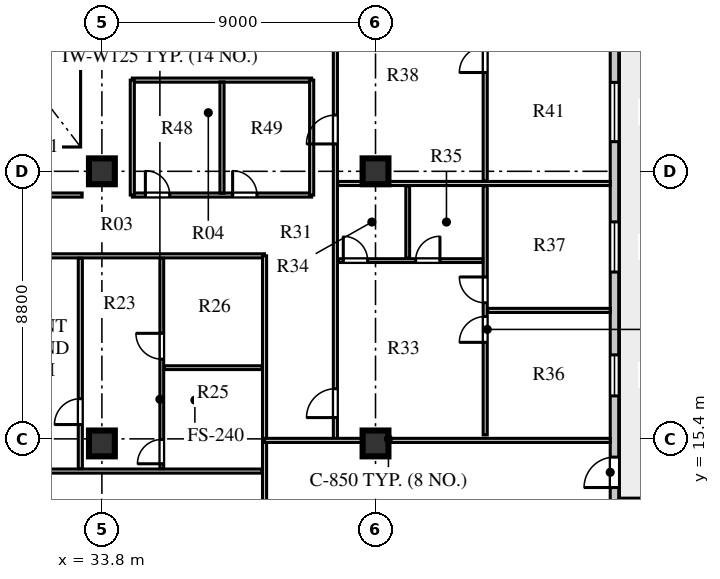
"""IFC4 building model, lengths in metres.
Left out: names, types, materials, properties, quantities, classifications, styles, units other than length and angle.
Written with IfcOpenShell. Run it as: python <this file> out.ifc"""

import sys

from ifc_helpers import new_model, si_unit, direction, frame, frame_2d, origin, origin_2d, place, context, subcontext, project, spatial, rectangle, extrude, element, fill, save


model = new_model("IFC4")
c1 = context("Model", 3, precision=1e-05, world=origin(), true_north=direction((0.0, 1.0)))
c2 = subcontext(c1, "Body", "Model", "MODEL_VIEW")
j1 = project(units=[si_unit("LENGTHUNIT", "METRE"), si_unit("PLANEANGLEUNIT", "RADIAN")], contexts=[c1])
p1 = place(None, origin())
s1 = spatial("IfcSite", under=j1, at=p1, CompositionType="ELEMENT")
p2 = place(p1, origin())
s2 = spatial("IfcBuilding", under=s1, at=p2, CompositionType="ELEMENT")
p3 = place(p2, frame((0.0, 0.0, 229.7)))
s3 = spatial("IfcBuildingStorey", under=s2, at=p3, CompositionType="ELEMENT", Elevation=229.7)
for number, where, z_axis, x_axis in (
    (1, (33.8, 15.25, 0.0), (0.0, 0.0, 1.0), (1.0, 0.0, 0.0)),
    (2, (33.8, 24.2, 0.0), (0.0, 0.0, 1.0), (1.0, 0.0, 0.0)),
    (3, (42.8, 15.25, 0.0), (0.0, 0.0, 1.0), (1.0, 0.0, 0.0)),
    (4, (42.8, 24.2, 0.0), (0.0, 0.0, 1.0), (1.0, 0.0, 0.0)),
):
    element("IfcColumn", number, at=place(p3, frame(where, z_axis=z_axis, x_axis=x_axis)), inside=s3, PredefinedType="COLUMN", context=c2, shape_type="SweptSolid", body=[
        extrude(rectangle(XDim=0.85, YDim=0.85, at=origin_2d()), origin(), (0.0, 0.0, 1.0), 3.66),
    ])
p4 = place(p3, frame((50.66, 13.13, 0.0), z_axis=(0.0, 0.0, 1.0), x_axis=(0.0, 1.0, 0.0)))
e5 = element("IfcWall", 5, at=p4, inside=s3, PredefinedType="STANDARD", context=c2, shape_type="SweptSolid", body=[
    extrude(rectangle(XDim=30.94, YDim=0.28, at=frame_2d((15.47, 0.0))), origin(), (0.0, 0.0, 1.0), 3.66),
])
p5 = place(p4, frame((0.67, 0.0, 0.0)))
e6 = element("IfcOpeningElement", 6, at=p5, cuts=e5, PredefinedType="OPENING", context=c2, shape_type="SweptSolid", body=[
    extrude(rectangle(XDim=1.0, YDim=2.05, at=frame_2d((0.5, 1.025))), frame((0.0, 0.15, 0.0), z_axis=(0.0, -1.0, 0.0), x_axis=(1.0, 0.0, 0.0)), (0.0, 0.0, 1.0), 0.3),
])
p6 = place(p4, frame((3.683, 0.0, 0.8)))
e7 = element("IfcOpeningElement", 7, at=p6, cuts=e5, PredefinedType="OPENING", context=c2, shape_type="SweptSolid", body=[
    extrude(rectangle(XDim=1.35, YDim=1.9, at=frame_2d((0.675, 0.95))), frame((0.0, 0.15, 0.0), z_axis=(0.0, -1.0, 0.0), x_axis=(1.0, 0.0, 0.0)), (0.0, 0.0, 1.0), 0.3),
])
p7 = place(p4, frame((7.757, 0.0, 0.8)))
e8 = element("IfcOpeningElement", 8, at=p7, cuts=e5, PredefinedType="OPENING", context=c2, shape_type="SweptSolid", body=[
    extrude(rectangle(XDim=1.65, YDim=1.95, at=frame_2d((0.825, 0.975))), frame((0.0, 0.15, 0.0), z_axis=(0.0, -1.0, 0.0), x_axis=(1.0, 0.0, 0.0)), (0.0, 0.0, 1.0), 0.3),
])
p8 = place(p4, frame((12.045, 0.0, 0.8)))
e9 = element("IfcOpeningElement", 9, at=p8, cuts=e5, PredefinedType="OPENING", context=c2, shape_type="SweptSolid", body=[
    extrude(rectangle(XDim=1.95, YDim=2.0, at=frame_2d((0.975, 1.0))), frame((0.0, 0.15, 0.0), z_axis=(0.0, -1.0, 0.0), x_axis=(1.0, 0.0, 0.0)), (0.0, 0.0, 1.0), 0.3),
])
p9 = place(p4, frame((16.595, 0.0, 0.8)))
e10 = element("IfcOpeningElement", 10, at=p9, cuts=e5, PredefinedType="OPENING", context=c2, shape_type="SweptSolid", body=[
    extrude(rectangle(XDim=2.25, YDim=2.0, at=frame_2d((1.125, 1.0))), frame((0.0, 0.15, 0.0), z_axis=(0.0, -1.0, 0.0), x_axis=(1.0, 0.0, 0.0)), (0.0, 0.0, 1.0), 0.3),
])
p10 = place(p4, frame((21.307, 0.0, 0.8)))
e11 = element("IfcOpeningElement", 11, at=p10, cuts=e5, PredefinedType="OPENING", context=c2, shape_type="SweptSolid", body=[
    extrude(rectangle(XDim=1.8, YDim=2.0, at=frame_2d((0.9, 1.0))), frame((0.0, 0.15, 0.0), z_axis=(0.0, -1.0, 0.0), x_axis=(1.0, 0.0, 0.0)), (0.0, 0.0, 1.0), 0.3),
])
p11 = place(p4, frame((25.782, 0.0, 0.8)))
e12 = element("IfcOpeningElement", 12, at=p11, cuts=e5, PredefinedType="OPENING", context=c2, shape_type="SweptSolid", body=[
    extrude(rectangle(XDim=1.5, YDim=2.0, at=frame_2d((0.75, 1.0))), frame((0.0, 0.15, 0.0), z_axis=(0.0, -1.0, 0.0), x_axis=(1.0, 0.0, 0.0)), (0.0, 0.0, 1.0), 0.3),
])
p12 = place(p4, frame((29.175, 0.0, 0.8)))
e13 = element("IfcOpeningElement", 13, at=p12, cuts=e5, PredefinedType="OPENING", context=c2, shape_type="SweptSolid", body=[
    extrude(rectangle(XDim=1.2, YDim=1.75, at=frame_2d((0.6, 0.875))), frame((0.0, 0.15, 0.0), z_axis=(0.0, -1.0, 0.0), x_axis=(1.0, 0.0, 0.0)), (0.0, 0.0, 1.0), 0.3),
])
p13 = place(p3, frame((27.08, 21.42, 0.0), z_axis=(0.0, 0.0, 1.0), x_axis=(1.0, 0.0, 0.0)))
e14 = element("IfcWall", 14, at=p13, inside=s3, PredefinedType="PARTITIONING", context=c2, shape_type="SweptSolid", body=[
    extrude(rectangle(XDim=12.07, YDim=0.135, at=frame_2d((6.035, 0.0))), origin(), (0.0, 0.0, 1.0), 3.31),
])
p14 = place(p13, frame((0.63, 0.0, 0.0)))
e15 = element("IfcOpeningElement", 15, at=p14, cuts=e14, PredefinedType="OPENING", context=c2, shape_type="SweptSolid", body=[
    extrude(rectangle(XDim=0.95, YDim=2.1, at=frame_2d((0.475, 1.05))), frame((0.0, 0.078, 0.0), z_axis=(0.0, -1.0, 0.0), x_axis=(1.0, 0.0, 0.0)), (0.0, 0.0, 1.0), 0.155),
])
p15 = place(p3, frame((27.15, 23.42, 0.0), z_axis=(0.0, 0.0, 1.0), x_axis=(1.0, 0.0, 0.0)))
e16 = element("IfcWall", 16, at=p15, inside=s3, PredefinedType="PARTITIONING", context=c2, shape_type="SweptSolid", body=[
    extrude(rectangle(XDim=6.0, YDim=0.135, at=frame_2d((3.0, 0.0))), origin(), (0.0, 0.0, 1.0), 3.66),
])
p16 = place(p3, frame((39.15, 7.88, 0.0), z_axis=(0.0, 0.0, 1.0), x_axis=(0.0, 1.0, 0.0)))
e17 = element("IfcWall", 17, at=p16, inside=s3, PredefinedType="PARTITIONING", context=c2, shape_type="SweptSolid", body=[
    extrude(rectangle(XDim=13.54, YDim=0.135, at=frame_2d((6.77, 0.0))), origin(), (0.0, 0.0, 1.0), 3.66),
])
p17 = place(p3, frame((27.24, 14.341, 0.0), z_axis=(0.0, 0.0, 1.0), x_axis=(1.0, 0.0, 0.0)))
e18 = element("IfcWall", 18, at=p17, inside=s3, PredefinedType="PARTITIONING", context=c2, shape_type="SweptSolid", body=[
    extrude(rectangle(XDim=11.83, YDim=0.135, at=frame_2d((5.915, 0.0))), origin(), (0.0, 0.0, 1.0), 3.66),
])
p18 = place(p17, frame((0.3, 0.0, 0.0)))
e19 = element("IfcOpeningElement", 19, at=p18, cuts=e18, PredefinedType="OPENING", context=c2, shape_type="SweptSolid", body=[
    extrude(rectangle(XDim=0.85, YDim=2.08, at=frame_2d((0.425, 1.04))), frame((0.0, 0.078, 0.0), z_axis=(0.0, -1.0, 0.0), x_axis=(1.0, 0.0, 0.0)), (0.0, 0.0, 1.0), 0.155),
])
p19 = place(p17, frame((3.135, 0.0, 0.0)))
e20 = element("IfcOpeningElement", 20, at=p19, cuts=e18, PredefinedType="OPENING", context=c2, shape_type="SweptSolid", body=[
    extrude(rectangle(XDim=0.85, YDim=2.08, at=frame_2d((0.425, 1.04))), frame((0.0, 0.078, 0.0), z_axis=(0.0, -1.0, 0.0), x_axis=(1.0, 0.0, 0.0)), (0.0, 0.0, 1.0), 0.155),
])
p20 = place(p3, frame((35.77, 14.421, 0.0), z_axis=(0.0, 0.0, 1.0), x_axis=(0.0, 1.0, 0.0)))
e21 = element("IfcWall", 21, at=p20, inside=s3, PredefinedType="PLUMBINGWALL", context=c2, shape_type="SweptSolid", body=[
    extrude(rectangle(XDim=6.919, YDim=0.125, at=frame_2d((3.459, 0.0))), origin(), (0.0, 0.0, 1.0), 3.66),
])
p21 = place(p20, frame((0.16, 0.0, 0.0)))
e22 = element("IfcOpeningElement", 22, at=p21, cuts=e21, PredefinedType="OPENING", context=c2, shape_type="SweptSolid", body=[
    extrude(rectangle(XDim=0.8, YDim=2.05, at=frame_2d((0.4, 1.025))), frame((0.0, 0.073, 0.0), z_axis=(0.0, -1.0, 0.0), x_axis=(1.0, 0.0, 0.0)), (0.0, 0.0, 1.0), 0.145),
])
p22 = place(p20, frame((3.601, 0.0, 0.0)))
e23 = element("IfcOpeningElement", 23, at=p22, cuts=e21, PredefinedType="OPENING", context=c2, shape_type="SweptSolid", body=[
    extrude(rectangle(XDim=0.85, YDim=2.08, at=frame_2d((0.425, 1.04))), frame((0.0, 0.073, 0.0), z_axis=(0.0, -1.0, 0.0), x_axis=(1.0, 0.0, 0.0)), (0.0, 0.0, 1.0), 0.145),
])
p23 = place(p3, frame((35.85, 17.742, 0.0), z_axis=(0.0, 0.0, 1.0), x_axis=(1.0, 0.0, 0.0)))
e24 = element("IfcWall", 24, at=p23, inside=s3, PredefinedType="PLUMBINGWALL", context=c2, shape_type="SweptSolid", body=[
    extrude(rectangle(XDim=3.22, YDim=0.125, at=frame_2d((1.61, 0.0))), origin(), (0.0, 0.0, 1.0), 3.66),
])
p24 = place(p3, frame((33.09, 14.421, 0.0), z_axis=(0.0, 0.0, 1.0), x_axis=(0.0, 1.0, 0.0)))
e25 = element("IfcWall", 25, at=p24, inside=s3, PredefinedType="PARTITIONING", context=c2, shape_type="SweptSolid", body=[
    extrude(rectangle(XDim=6.919, YDim=0.135, at=frame_2d((3.459, 0.0))), origin(), (0.0, 0.0, 1.0), 3.66),
])
p25 = place(p24, frame((1.45, 0.0, 0.0)))
e26 = element("IfcOpeningElement", 26, at=p25, cuts=e25, PredefinedType="OPENING", context=c2, shape_type="SweptSolid", body=[
    extrude(rectangle(XDim=0.85, YDim=2.08, at=frame_2d((0.425, 1.04))), frame((0.0, 0.078, 0.0), z_axis=(0.0, -1.0, 0.0), x_axis=(1.0, 0.0, 0.0)), (0.0, 0.0, 1.0), 0.155),
])
p26 = place(p3, frame((41.48, 15.35, 0.0), z_axis=(0.0, 0.0, 1.0), x_axis=(0.0, 1.0, 0.0)))
e27 = element("IfcWall", 27, at=p26, inside=s3, PredefinedType="PARTITIONING", context=c2, shape_type="SweptSolid", body=[
    extrude(rectangle(XDim=26.5, YDim=0.135, at=frame_2d((13.25, 0.0))), origin(), (0.0, 0.0, 1.0), 3.66),
])
p27 = place(p26, frame((0.75, 0.0, 0.0)))
e28 = element("IfcOpeningElement", 28, at=p27, cuts=e27, PredefinedType="OPENING", context=c2, shape_type="SweptSolid", body=[
    extrude(rectangle(XDim=0.95, YDim=2.1, at=frame_2d((0.475, 1.05))), frame((0.0, 0.078, 0.0), z_axis=(0.0, -1.0, 0.0), x_axis=(1.0, 0.0, 0.0)), (0.0, 0.0, 1.0), 0.155),
])
p28 = place(p26, frame((9.75, 0.0, 0.0)))
e29 = element("IfcOpeningElement", 29, at=p28, cuts=e27, PredefinedType="OPENING", context=c2, shape_type="SweptSolid", body=[
    extrude(rectangle(XDim=0.95, YDim=2.1, at=frame_2d((0.475, 1.05))), frame((0.0, 0.078, 0.0), z_axis=(0.0, -1.0, 0.0), x_axis=(1.0, 0.0, 0.0)), (0.0, 0.0, 1.0), 0.155),
])
p29 = place(p26, frame((18.5, 0.0, 0.0)))
e30 = element("IfcOpeningElement", 30, at=p29, cuts=e27, PredefinedType="OPENING", context=c2, shape_type="SweptSolid", body=[
    extrude(rectangle(XDim=0.95, YDim=2.1, at=frame_2d((0.475, 1.05))), frame((0.0, 0.078, 0.0), z_axis=(0.0, -1.0, 0.0), x_axis=(1.0, 0.0, 0.0)), (0.0, 0.0, 1.0), 0.155),
])
p30 = place(p3, frame((39.15, 15.35, 0.0), z_axis=(0.0, 0.0, 1.0), x_axis=(1.0, 0.0, 0.0)))
e31 = element("IfcWall", 31, at=p30, inside=s3, PredefinedType="PARTITIONING", context=c2, shape_type="SweptSolid", body=[
    extrude(rectangle(XDim=11.37, YDim=0.135, at=frame_2d((5.685, 0.0))), origin(), (0.0, 0.0, 1.0), 3.06),
])
p31 = place(p3, frame((46.408, 15.53, 0.0), z_axis=(0.0, 0.0, 1.0), x_axis=(0.0, 1.0, 0.0)))
e32 = element("IfcWall", 32, at=p31, inside=s3, PredefinedType="PARTITIONING", context=c2, shape_type="SweptSolid", body=[
    extrude(rectangle(XDim=8.19, YDim=0.135, at=frame_2d((4.095, 0.0))), origin(), (0.0, 0.0, 1.0), 3.66),
])
p32 = place(p31, frame((3.045, 0.0, 0.0)))
e33 = element("IfcOpeningElement", 33, at=p32, cuts=e32, PredefinedType="OPENING", context=c2, shape_type="SweptSolid", body=[
    extrude(rectangle(XDim=0.85, YDim=2.08, at=frame_2d((0.425, 1.04))), frame((0.0, 0.078, 0.0), z_axis=(0.0, -1.0, 0.0), x_axis=(1.0, 0.0, 0.0)), (0.0, 0.0, 1.0), 0.155),
])
p33 = place(p31, frame((4.345, 0.0, 0.0)))
e34 = element("IfcOpeningElement", 34, at=p33, cuts=e32, PredefinedType="OPENING", context=c2, shape_type="SweptSolid", body=[
    extrude(rectangle(XDim=0.85, YDim=2.08, at=frame_2d((0.425, 1.04))), frame((0.0, 0.078, 0.0), z_axis=(0.0, -1.0, 0.0), x_axis=(1.0, 0.0, 0.0)), (0.0, 0.0, 1.0), 0.155),
])
p34 = place(p3, frame((41.58, 21.263, 0.0), z_axis=(0.0, 0.0, 1.0), x_axis=(1.0, 0.0, 0.0)))
e35 = element("IfcWall", 35, at=p34, inside=s3, PredefinedType="PLUMBINGWALL", context=c2, shape_type="SweptSolid", body=[
    extrude(rectangle(XDim=4.748, YDim=0.125, at=frame_2d((2.374, 0.0))), origin(), (0.0, 0.0, 1.0), 3.31),
])
p35 = place(p34, frame((0.16, 0.0, 0.0)))
e36 = element("IfcOpeningElement", 36, at=p35, cuts=e35, PredefinedType="OPENING", context=c2, shape_type="SweptSolid", body=[
    extrude(rectangle(XDim=0.8, YDim=2.05, at=frame_2d((0.4, 1.025))), frame((0.0, 0.073, 0.0), z_axis=(0.0, -1.0, 0.0), x_axis=(1.0, 0.0, 0.0)), (0.0, 0.0, 1.0), 0.145),
])
p36 = place(p34, frame((2.539, 0.0, 0.0)))
e37 = element("IfcOpeningElement", 37, at=p36, cuts=e35, PredefinedType="OPENING", context=c2, shape_type="SweptSolid", body=[
    extrude(rectangle(XDim=0.8, YDim=2.05, at=frame_2d((0.4, 1.025))), frame((0.0, 0.073, 0.0), z_axis=(0.0, -1.0, 0.0), x_axis=(1.0, 0.0, 0.0)), (0.0, 0.0, 1.0), 0.145),
])
p37 = place(p3, frame((43.859, 21.343, 0.0), z_axis=(0.0, 0.0, 1.0), x_axis=(0.0, 1.0, 0.0)))
e38 = element("IfcWall", 38, at=p37, inside=s3, PredefinedType="PLUMBINGWALL", context=c2, shape_type="SweptSolid", body=[
    extrude(rectangle(XDim=2.377, YDim=0.125, at=frame_2d((1.188, 0.0))), origin(), (0.0, 0.0, 1.0), 3.66),
])
p38 = place(p3, frame((46.488, 19.625, 0.0), z_axis=(0.0, 0.0, 1.0), x_axis=(1.0, 0.0, 0.0)))
e39 = element("IfcWall", 39, at=p38, inside=s3, PredefinedType="PARTITIONING", context=c2, shape_type="SweptSolid", body=[
    extrude(rectangle(XDim=4.032, YDim=0.135, at=frame_2d((2.016, 0.0))), origin(), (0.0, 0.0, 1.0), 3.66),
])
p39 = place(p3, frame((41.56, 23.8, 0.0), z_axis=(0.0, 0.0, 1.0), x_axis=(1.0, 0.0, 0.0)))
e40 = element("IfcWall", 40, at=p39, inside=s3, PredefinedType="PARTITIONING", context=c2, shape_type="SweptSolid", body=[
    extrude(rectangle(XDim=8.96, YDim=0.135, at=frame_2d((4.48, 0.0))), origin(), (0.0, 0.0, 1.0), 3.66),
])
p40 = place(p3, frame((46.408, 23.88, 0.0), z_axis=(0.0, 0.0, 1.0), x_axis=(0.0, 1.0, 0.0)))
e41 = element("IfcWall", 41, at=p40, inside=s3, PredefinedType="PARTITIONING", context=c2, shape_type="SweptSolid", body=[
    extrude(rectangle(XDim=9.24, YDim=0.135, at=frame_2d((4.62, 0.0))), origin(), (0.0, 0.0, 1.0), 3.66),
])
p41 = place(p40, frame((3.57, 0.0, 0.0)))
e42 = element("IfcOpeningElement", 42, at=p41, cuts=e41, PredefinedType="OPENING", context=c2, shape_type="SweptSolid", body=[
    extrude(rectangle(XDim=0.85, YDim=2.08, at=frame_2d((0.425, 1.04))), frame((0.0, 0.078, 0.0), z_axis=(0.0, -1.0, 0.0), x_axis=(1.0, 0.0, 0.0)), (0.0, 0.0, 1.0), 0.155),
])
p42 = place(p40, frame((4.87, 0.0, 0.0)))
e43 = element("IfcOpeningElement", 43, at=p42, cuts=e41, PredefinedType="OPENING", context=c2, shape_type="SweptSolid", body=[
    extrude(rectangle(XDim=0.85, YDim=2.08, at=frame_2d((0.425, 1.04))), frame((0.0, 0.078, 0.0), z_axis=(0.0, -1.0, 0.0), x_axis=(1.0, 0.0, 0.0)), (0.0, 0.0, 1.0), 0.155),
])
p43 = place(p3, frame((34.8, 23.42, 0.0), z_axis=(0.0, 0.0, 1.0), x_axis=(1.0, 0.0, 0.0)))
e44 = element("IfcWall", 44, at=p43, inside=s3, PredefinedType="PARTITIONING", context=c2, shape_type="SweptSolid", body=[
    extrude(rectangle(XDim=5.9, YDim=0.135, at=frame_2d((2.95, 0.0))), origin(), (0.0, 0.0, 1.0), 3.66),
])
p44 = place(p43, frame((0.43, 0.0, 0.0)))
e45 = element("IfcOpeningElement", 45, at=p44, cuts=e44, PredefinedType="OPENING", context=c2, shape_type="SweptSolid", body=[
    extrude(rectangle(XDim=0.8, YDim=2.05, at=frame_2d((0.4, 1.025))), frame((0.0, 0.078, 0.0), z_axis=(0.0, -1.0, 0.0), x_axis=(1.0, 0.0, 0.0)), (0.0, 0.0, 1.0), 0.155),
])
p45 = place(p43, frame((3.3, 0.0, 0.0)))
e46 = element("IfcOpeningElement", 46, at=p45, cuts=e44, PredefinedType="OPENING", context=c2, shape_type="SweptSolid", body=[
    extrude(rectangle(XDim=0.8, YDim=2.05, at=frame_2d((0.4, 1.025))), frame((0.0, 0.078, 0.0), z_axis=(0.0, -1.0, 0.0), x_axis=(1.0, 0.0, 0.0)), (0.0, 0.0, 1.0), 0.155),
])
p46 = place(p3, frame((34.8, 27.2, 0.0), z_axis=(0.0, 0.0, 1.0), x_axis=(1.0, 0.0, 0.0)))
e47 = element("IfcWall", 47, at=p46, inside=s3, PredefinedType="PARTITIONING", context=c2, shape_type="SweptSolid", body=[
    extrude(rectangle(XDim=5.9, YDim=0.135, at=frame_2d((2.95, 0.0))), origin(), (0.0, 0.0, 1.0), 3.31),
])
for number, where, z_axis, x_axis in (
    (48, (34.8, 23.42, 0.0), (0.0, 0.0, 1.0), (0.0, 1.0, 0.0)),
    (49, (40.7, 23.42, 0.0), (0.0, 0.0, 1.0), (0.0, 1.0, 0.0)),
):
    element("IfcWall", number, at=place(p3, frame(where, z_axis=z_axis, x_axis=x_axis)), inside=s3, PredefinedType="PARTITIONING", context=c2, shape_type="SweptSolid", body=[
        extrude(rectangle(XDim=3.78, YDim=0.135, at=frame_2d((1.89, 0.0))), origin(), (0.0, 0.0, 1.0), 3.66),
    ])
p47 = place(p3, frame((37.75, 23.48, 0.0), z_axis=(0.0, 0.0, 1.0), x_axis=(0.0, 1.0, 0.0)))
e50 = element("IfcWall", 50, at=p47, inside=s3, PredefinedType="PARTITIONING", context=c2, shape_type="SweptSolid", body=[
    extrude(rectangle(XDim=3.66, YDim=0.135, at=frame_2d((1.83, 0.0))), origin(), (0.0, 0.0, 1.0), 3.66),
])
p48 = place(p5, frame((1.0, 0.0, 0.0), z_axis=(0.0, 0.0, 1.0), x_axis=(-1.0, 0.0, 0.0)))
e51 = element("IfcDoor", 51, at=p48, inside=s3, OperationType="SINGLE_SWING_RIGHT", PredefinedType="DOOR", context=c2, shape_type="SweptSolid", body=[
    extrude(rectangle(XDim=1.0, YDim=2.05, at=frame_2d((0.5, 1.025))), frame((0.0, 0.025, 0.0), z_axis=(0.0, -1.0, 0.0), x_axis=(1.0, 0.0, 0.0)), (0.0, 0.0, 1.0), 0.05),
])
fill(e6, e51)
p49 = place(p6, origin())
e52 = element("IfcWindow", 52, at=p49, inside=s3, PartitioningType="SINGLE_PANEL", PredefinedType="WINDOW", context=c2, shape_type="SweptSolid", body=[
    extrude(rectangle(XDim=1.35, YDim=1.9, at=frame_2d((0.675, 0.95))), frame((0.0, 0.03, 0.0), z_axis=(0.0, -1.0, 0.0), x_axis=(1.0, 0.0, 0.0)), (0.0, 0.0, 1.0), 0.06),
])
fill(e7, e52)
p50 = place(p7, origin())
e53 = element("IfcWindow", 53, at=p50, inside=s3, PartitioningType="SINGLE_PANEL", PredefinedType="WINDOW", context=c2, shape_type="SweptSolid", body=[
    extrude(rectangle(XDim=1.65, YDim=1.95, at=frame_2d((0.825, 0.975))), frame((0.0, 0.03, 0.0), z_axis=(0.0, -1.0, 0.0), x_axis=(1.0, 0.0, 0.0)), (0.0, 0.0, 1.0), 0.06),
])
fill(e8, e53)
p51 = place(p8, origin())
e54 = element("IfcWindow", 54, at=p51, inside=s3, PartitioningType="SINGLE_PANEL", PredefinedType="WINDOW", context=c2, shape_type="SweptSolid", body=[
    extrude(rectangle(XDim=1.95, YDim=2.0, at=frame_2d((0.975, 1.0))), frame((0.0, 0.03, 0.0), z_axis=(0.0, -1.0, 0.0), x_axis=(1.0, 0.0, 0.0)), (0.0, 0.0, 1.0), 0.06),
])
fill(e9, e54)
p52 = place(p25, origin())
e55 = element("IfcDoor", 55, at=p52, inside=s3, OperationType="SINGLE_SWING_LEFT", PredefinedType="DOOR", context=c2, shape_type="SweptSolid", body=[
    extrude(rectangle(XDim=0.85, YDim=2.08, at=frame_2d((0.425, 1.04))), frame((0.0, 0.025, 0.0), z_axis=(0.0, -1.0, 0.0), x_axis=(1.0, 0.0, 0.0)), (0.0, 0.0, 1.0), 0.05),
])
fill(e26, e55)
p53 = place(p21, origin())
e56 = element("IfcDoor", 56, at=p53, inside=s3, OperationType="SINGLE_SWING_LEFT", PredefinedType="DOOR", context=c2, shape_type="SweptSolid", body=[
    extrude(rectangle(XDim=0.8, YDim=2.05, at=frame_2d((0.4, 1.025))), frame((0.0, 0.025, 0.0), z_axis=(0.0, -1.0, 0.0), x_axis=(1.0, 0.0, 0.0)), (0.0, 0.0, 1.0), 0.05),
])
fill(e22, e56)
p54 = place(p22, origin())
e57 = element("IfcDoor", 57, at=p54, inside=s3, OperationType="SINGLE_SWING_RIGHT", PredefinedType="DOOR", context=c2, shape_type="SweptSolid", body=[
    extrude(rectangle(XDim=0.85, YDim=2.08, at=frame_2d((0.425, 1.04))), frame((0.0, 0.025, 0.0), z_axis=(0.0, -1.0, 0.0), x_axis=(1.0, 0.0, 0.0)), (0.0, 0.0, 1.0), 0.05),
])
fill(e23, e57)
p55 = place(p35, origin())
e58 = element("IfcDoor", 58, at=p55, inside=s3, OperationType="SINGLE_SWING_LEFT", PredefinedType="DOOR", context=c2, shape_type="SweptSolid", body=[
    extrude(rectangle(XDim=0.8, YDim=2.05, at=frame_2d((0.4, 1.025))), frame((0.0, 0.025, 0.0), z_axis=(0.0, -1.0, 0.0), x_axis=(1.0, 0.0, 0.0)), (0.0, 0.0, 1.0), 0.05),
])
fill(e36, e58)
p56 = place(p36, origin())
e59 = element("IfcDoor", 59, at=p56, inside=s3, OperationType="SINGLE_SWING_RIGHT", PredefinedType="DOOR", context=c2, shape_type="SweptSolid", body=[
    extrude(rectangle(XDim=0.8, YDim=2.05, at=frame_2d((0.4, 1.025))), frame((0.0, 0.025, 0.0), z_axis=(0.0, -1.0, 0.0), x_axis=(1.0, 0.0, 0.0)), (0.0, 0.0, 1.0), 0.05),
])
fill(e37, e59)
p57 = place(p32, origin())
e60 = element("IfcDoor", 60, at=p57, inside=s3, OperationType="SINGLE_SWING_LEFT", PredefinedType="DOOR", context=c2, shape_type="SweptSolid", body=[
    extrude(rectangle(XDim=0.85, YDim=2.08, at=frame_2d((0.425, 1.04))), frame((0.0, 0.025, 0.0), z_axis=(0.0, -1.0, 0.0), x_axis=(1.0, 0.0, 0.0)), (0.0, 0.0, 1.0), 0.05),
])
fill(e33, e60)
p58 = place(p33, origin())
e61 = element("IfcDoor", 61, at=p58, inside=s3, OperationType="SINGLE_SWING_RIGHT", PredefinedType="DOOR", context=c2, shape_type="SweptSolid", body=[
    extrude(rectangle(XDim=0.85, YDim=2.08, at=frame_2d((0.425, 1.04))), frame((0.0, 0.025, 0.0), z_axis=(0.0, -1.0, 0.0), x_axis=(1.0, 0.0, 0.0)), (0.0, 0.0, 1.0), 0.05),
])
fill(e34, e61)
p59 = place(p27, origin())
e62 = element("IfcDoor", 62, at=p59, inside=s3, OperationType="SINGLE_SWING_LEFT", PredefinedType="DOOR", context=c2, shape_type="SweptSolid", body=[
    extrude(rectangle(XDim=0.95, YDim=2.1, at=frame_2d((0.475, 1.05))), frame((0.0, 0.025, 0.0), z_axis=(0.0, -1.0, 0.0), x_axis=(1.0, 0.0, 0.0)), (0.0, 0.0, 1.0), 0.05),
])
fill(e28, e62)
p60 = place(p41, origin())
e63 = element("IfcDoor", 63, at=p60, inside=s3, OperationType="SINGLE_SWING_LEFT", PredefinedType="DOOR", context=c2, shape_type="SweptSolid", body=[
    extrude(rectangle(XDim=0.85, YDim=2.08, at=frame_2d((0.425, 1.04))), frame((0.0, 0.025, 0.0), z_axis=(0.0, -1.0, 0.0), x_axis=(1.0, 0.0, 0.0)), (0.0, 0.0, 1.0), 0.05),
])
fill(e42, e63)
p61 = place(p28, origin())
e64 = element("IfcDoor", 64, at=p61, inside=s3, OperationType="SINGLE_SWING_LEFT", PredefinedType="DOOR", context=c2, shape_type="SweptSolid", body=[
    extrude(rectangle(XDim=0.95, YDim=2.1, at=frame_2d((0.475, 1.05))), frame((0.0, 0.025, 0.0), z_axis=(0.0, -1.0, 0.0), x_axis=(1.0, 0.0, 0.0)), (0.0, 0.0, 1.0), 0.05),
])
fill(e29, e64)
p62 = place(p44, origin())
e65 = element("IfcDoor", 65, at=p62, inside=s3, OperationType="SINGLE_SWING_LEFT", PredefinedType="DOOR", context=c2, shape_type="SweptSolid", body=[
    extrude(rectangle(XDim=0.8, YDim=2.05, at=frame_2d((0.4, 1.025))), frame((0.0, 0.025, 0.0), z_axis=(0.0, -1.0, 0.0), x_axis=(1.0, 0.0, 0.0)), (0.0, 0.0, 1.0), 0.05),
])
fill(e45, e65)
p63 = place(p45, origin())
e66 = element("IfcDoor", 66, at=p63, inside=s3, OperationType="SINGLE_SWING_LEFT", PredefinedType="DOOR", context=c2, shape_type="SweptSolid", body=[
    extrude(rectangle(XDim=0.8, YDim=2.05, at=frame_2d((0.4, 1.025))), frame((0.0, 0.025, 0.0), z_axis=(0.0, -1.0, 0.0), x_axis=(1.0, 0.0, 0.0)), (0.0, 0.0, 1.0), 0.05),
])
fill(e46, e66)
save(model, sys.argv[1])
